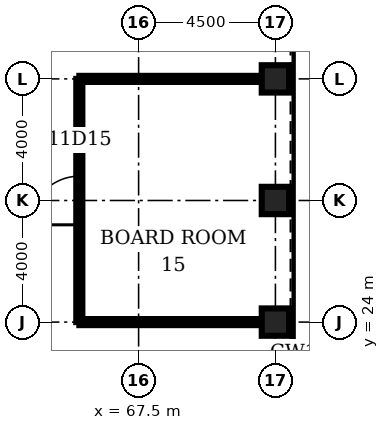
"""IFC4 building model, lengths in metres.
Left out: names, types, materials, properties, quantities, classifications, styles, units other than length and angle.
Written with IfcOpenShell. Run it as: python <this file> out.ifc"""

import sys

from ifc_helpers import new_model, si_unit, direction, frame, frame_2d, origin, origin_2d, place, context, subcontext, project, spatial, rectangle, hollow_rectangle, extrude, element, fill, save


model = new_model("IFC4")
c1 = context("Model", 3, precision=1e-05, world=origin(), true_north=direction((0.0, 1.0)))
c2 = subcontext(c1, "Body", "Model", "MODEL_VIEW")
j1 = project(units=[si_unit("LENGTHUNIT", "METRE"), si_unit("PLANEANGLEUNIT", "RADIAN")], contexts=[c1])
p1 = place(None, origin())
s1 = spatial("IfcSite", under=j1, at=p1, CompositionType="ELEMENT")
p2 = place(p1, origin())
s2 = spatial("IfcBuilding", under=s1, at=p2, CompositionType="ELEMENT")
p3 = place(p2, frame((0.0, 0.0, 54.5)))
s3 = spatial("IfcBuildingStorey", under=s2, at=p3, CompositionType="ELEMENT", Elevation=54.5)
for number, where, z_axis, x_axis in (
    (1, (72.0, 24.0, 0.0), (0.0, 0.0, 1.0), (1.0, 0.0, 0.0)),
    (2, (72.0, 28.0, 0.0), (0.0, 0.0, 1.0), (1.0, 0.0, 0.0)),
    (3, (72.0, 32.0, 0.0), (0.0, 0.0, 1.0), (1.0, 0.0, 0.0)),
):
    element("IfcColumn", number, at=place(p3, frame(where, z_axis=z_axis, x_axis=x_axis)), inside=s3, PredefinedType="COLUMN", context=c2, shape_type="SweptSolid", body=[
        extrude(hollow_rectangle(XDim=0.9, YDim=0.9, WallThickness=0.12, at=origin_2d()), origin(), (0.0, 0.0, 1.0), 4.5),
    ])
for number, where, z_axis, x_axis in (
    (4, (65.55, 24.0, 0.0), (0.0, 0.0, 1.0), (1.0, 0.0, 0.0)),
    (5, (65.55, 32.0, 0.0), (0.0, 0.0, 1.0), (1.0, 0.0, 0.0)),
):
    element("IfcWall", number, at=place(p3, frame(where, z_axis=z_axis, x_axis=x_axis)), inside=s3, PredefinedType="PARTITIONING", context=c2, shape_type="SweptSolid", body=[
        extrude(rectangle(XDim=6.0, YDim=0.2, at=frame_2d((3.0, 0.0))), origin(), (0.0, 0.0, 1.0), 3.0),
    ])
p4 = place(p3, frame((65.55, 24.0, 0.0), z_axis=(0.0, 0.0, 1.0), x_axis=(0.0, 1.0, 0.0)))
e6 = element("IfcWall", 6, at=p4, inside=s3, PredefinedType="PARTITIONING", context=c2, shape_type="SweptSolid", body=[
    extrude(rectangle(XDim=8.0, YDim=0.2, at=frame_2d((4.0, 0.0))), origin(), (0.0, 0.0, 1.0), 3.0),
])
p5 = place(p4, frame((3.2, 0.0, 0.0)))
e7 = element("IfcOpeningElement", 7, at=p5, cuts=e6, PredefinedType="OPENING", context=c2, shape_type="SweptSolid", body=[
    extrude(rectangle(XDim=1.6, YDim=2.1, at=frame_2d((0.8, 1.05))), frame((0.0, 0.11, 0.0), z_axis=(0.0, -1.0, 0.0), x_axis=(1.0, 0.0, 0.0)), (0.0, 0.0, 1.0), 0.22),
])
p6 = place(p5, origin())
e8 = element("IfcDoor", 8, at=p6, inside=s3, OperationType="SINGLE_SWING_LEFT", PredefinedType="DOOR", context=c2, shape_type="SweptSolid", body=[
    extrude(rectangle(XDim=1.6, YDim=2.1, at=frame_2d((0.8, 1.05))), frame((0.0, 0.025, 0.0), z_axis=(0.0, -1.0, 0.0), x_axis=(1.0, 0.0, 0.0)), (0.0, 0.0, 1.0), 0.05),
])
fill(e7, e8)
save(model, sys.argv[1])
